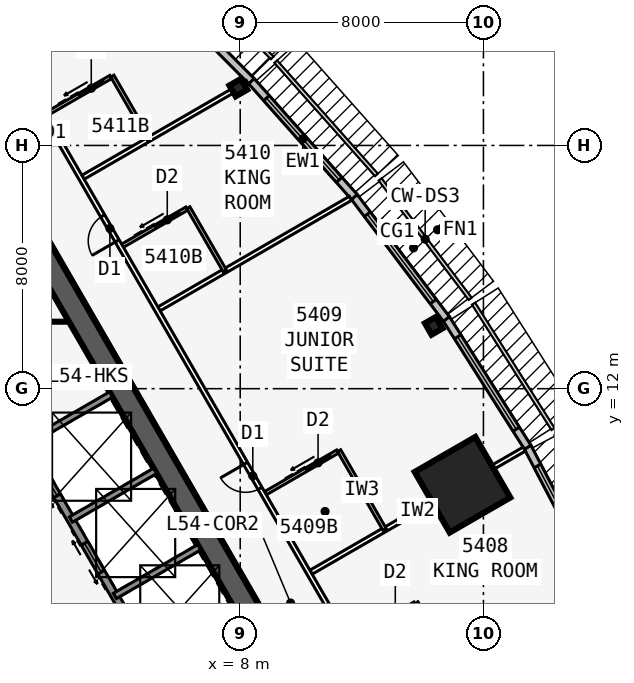
"""IFC4 building model, lengths in metres.
Left out: names, types, materials, properties, quantities, classifications, styles, units other than length and angle.
Written with IfcOpenShell. Run it as: python <this file> out.ifc"""

import sys

from ifc_helpers import new_model, si_unit, direction, frame, frame_2d, origin, origin_2d, place, context, subcontext, project, spatial, rectangle, i_section, extrude, element, fill, save


model = new_model("IFC4")
c1 = context("Model", 3, precision=1e-05, world=origin(), true_north=direction((0.0, 1.0)))
c2 = subcontext(c1, "Body", "Model", "MODEL_VIEW")
j1 = project(units=[si_unit("LENGTHUNIT", "METRE"), si_unit("PLANEANGLEUNIT", "RADIAN")], contexts=[c1])
p1 = place(None, origin())
s1 = spatial("IfcSite", under=j1, at=p1, CompositionType="ELEMENT")
p2 = place(p1, origin())
s2 = spatial("IfcBuilding", under=s1, at=p2, CompositionType="ELEMENT")
p3 = place(p2, frame((0.0, 0.0, 204.5)))
s3 = spatial("IfcBuildingStorey", under=s2, at=p3, CompositionType="ELEMENT", Elevation=204.5)
p4 = place(p3, frame((16.5, -9.526, 0.0), z_axis=(0.0, 0.0, 1.0), x_axis=(-0.499999749417, 0.866025548458, 0.0)))
e1 = element("IfcWall", 1, at=p4, inside=s3, PredefinedType="SHEAR", context=c2, shape_type="SweptSolid", body=[
    extrude(rectangle(XDim=33.0, YDim=0.75, at=frame_2d((16.5, 0.0))), origin(), (0.0, 0.0, 1.0), 3.6),
])
p5 = place(p4, frame((14.15, 0.0, 0.0)))
e2 = element("IfcOpeningElement", 2, at=p5, cuts=e1, PredefinedType="OPENING", context=c2, shape_type="SweptSolid", body=[
    extrude(rectangle(XDim=1.8, YDim=2.13, at=frame_2d((0.9, 1.065))), frame((0.0, 0.385, 0.0), z_axis=(0.0, -1.0, 0.0), x_axis=(1.0, 0.0, 0.0)), (0.0, 0.0, 1.0), 0.77),
])
p6 = place(p4, frame((12.6, 0.0, 0.0)))
e3 = element("IfcOpeningElement", 3, at=p6, cuts=e1, PredefinedType="OPENING", context=c2, shape_type="SweptSolid", body=[
    extrude(rectangle(XDim=1.0, YDim=2.13, at=frame_2d((0.5, 1.065))), frame((0.0, 0.385, 0.0), z_axis=(0.0, -1.0, 0.0), x_axis=(1.0, 0.0, 0.0)), (0.0, 0.0, 1.0), 0.77),
])
p7 = place(p3, frame((5.379, 2.586, 0.0), z_axis=(0.0, 0.0, 1.0), x_axis=(-0.500001375892, 0.866024609411, 0.0)))
e4 = element("IfcWall", 4, at=p7, inside=s3, PredefinedType="SOLIDWALL", context=c2, shape_type="SweptSolid", body=[
    extrude(rectangle(XDim=10.633, YDim=0.25, at=frame_2d((5.316, 0.0))), origin(), (0.0, 0.0, 1.0), 3.435),
])
p8 = place(p7, frame((9.164, 0.0, 0.0)))
e5 = element("IfcOpeningElement", 5, at=p8, cuts=e4, PredefinedType="OPENING", context=c2, shape_type="SweptSolid", body=[
    extrude(rectangle(XDim=0.9, YDim=2.13, at=frame_2d((0.45, 1.065))), frame((0.0, 0.135, 0.0), z_axis=(0.0, -1.0, 0.0), x_axis=(1.0, 0.0, 0.0)), (0.0, 0.0, 1.0), 0.27),
])
p9 = place(p7, frame((1.0, 0.0, 0.0)))
e6 = element("IfcOpeningElement", 6, at=p9, cuts=e4, PredefinedType="OPENING", context=c2, shape_type="SweptSolid", body=[
    extrude(rectangle(XDim=1.1, YDim=2.13, at=frame_2d((0.55, 1.065))), frame((0.0, 0.135, 0.0), z_axis=(0.0, -1.0, 0.0), x_axis=(1.0, 0.0, 0.0)), (0.0, 0.0, 1.0), 0.27),
])
p10 = place(p7, frame((3.9, 0.0, 0.0)))
e7 = element("IfcOpeningElement", 7, at=p10, cuts=e4, PredefinedType="OPENING", context=c2, shape_type="SweptSolid", body=[
    extrude(rectangle(XDim=1.1, YDim=2.13, at=frame_2d((0.55, 1.065))), frame((0.0, 0.135, 0.0), z_axis=(0.0, -1.0, 0.0), x_axis=(1.0, 0.0, 0.0)), (0.0, 0.0, 1.0), 0.27),
])
p11 = place(p7, frame((6.8, 0.0, 0.0)))
e8 = element("IfcOpeningElement", 8, at=p11, cuts=e4, PredefinedType="OPENING", context=c2, shape_type="SweptSolid", body=[
    extrude(rectangle(XDim=1.1, YDim=2.13, at=frame_2d((0.55, 1.065))), frame((0.0, 0.135, 0.0), z_axis=(0.0, -1.0, 0.0), x_axis=(1.0, 0.0, 0.0)), (0.0, 0.0, 1.0), 0.27),
])
for number, where, z_axis, x_axis in (
    (9, (3.879, 5.184, 0.0), (0.0, 0.0, 1.0), (0.866, 0.5, 0.0)),
    (10, (2.429, 7.696, 0.0), (0.0, 0.0, 1.0), (0.866, 0.5, 0.0)),
    (11, (0.979, 10.207, 0.0), (0.0, 0.0, 1.0), (0.866, 0.5, 0.0)),
):
    element("IfcWall", number, at=place(p3, frame(where, z_axis=z_axis, x_axis=x_axis)), inside=s3, PredefinedType="SOLIDWALL", context=c2, shape_type="SweptSolid", body=[
        extrude(rectangle(XDim=3.2, YDim=0.2, at=frame_2d((1.6, 0.0))), origin(), (0.0, 0.0, 1.0), 3.435),
    ])
for number, where, z_axis, x_axis in (
    (12, (14.363, 14.066, 0.0), (0.0, 0.0, 1.0), (0.866, 0.5, 0.0)),
    (13, (7.937, 21.903, 0.0), (0.0, 0.0, 1.0), (-0.5, 0.866, 0.0)),
):
    element("IfcColumn", number, at=place(p3, frame(where, z_axis=z_axis, x_axis=x_axis)), inside=s3, PredefinedType="COLUMN", context=c2, shape_type="SweptSolid", body=[
        extrude(i_section(OverallWidth=0.411, OverallDepth=0.434, WebThickness=0.036, FlangeThickness=0.057, at=origin_2d()), origin(), (0.0, 0.0, 1.0), 3.6),
    ])
p12 = place(p3, frame((15.312, 8.84, 0.0), z_axis=(0.0, 0.0, 1.0), x_axis=(0.866025403784, 0.5, 0.0)))
e14 = element("IfcColumn", 14, at=p12, inside=s3, PredefinedType="COLUMN", context=c2, shape_type="SweptSolid", body=[
    extrude(rectangle(XDim=2.3, YDim=2.3, at=origin_2d()), origin(), (0.0, 0.0, 1.0), 3.6),
])
p13 = place(p3, frame((19.772, 5.648, 0.0), z_axis=(0.0, 0.0, 1.0), x_axis=(-0.463976002579, 0.885847768542, 0.0)))
e15 = element("IfcWall", 15, at=p13, inside=s3, PredefinedType="STANDARD", context=c2, shape_type="SweptSolid", body=[
    extrude(rectangle(XDim=5.004, YDim=0.25, at=frame_2d((2.502, 0.0))), origin(), (0.0, 0.0, 1.0), 3.435),
])
p14 = place(p13, frame((0.702, 0.0, 0.45)))
e16 = element("IfcOpeningElement", 16, at=p14, cuts=e15, PredefinedType="OPENING", context=c2, shape_type="SweptSolid", body=[
    extrude(rectangle(XDim=3.6, YDim=2.6, at=frame_2d((1.8, 1.3))), frame((0.0, 0.135, 0.0), z_axis=(0.0, -1.0, 0.0), x_axis=(1.0, 0.0, 0.0)), (0.0, 0.0, 1.0), 0.27),
])
p15 = place(p3, frame((17.456, 10.072, 0.0), z_axis=(0.0, 0.0, 1.0), x_axis=(-0.535220361449, 0.844712474568, 0.0)))
e17 = element("IfcWall", 17, at=p15, inside=s3, PredefinedType="STANDARD", context=c2, shape_type="SweptSolid", body=[
    extrude(rectangle(XDim=5.004, YDim=0.25, at=frame_2d((2.502, 0.0))), origin(), (0.0, 0.0, 1.0), 3.435),
])
p16 = place(p15, frame((0.702, 0.0, 0.45)))
e18 = element("IfcOpeningElement", 18, at=p16, cuts=e17, PredefinedType="OPENING", context=c2, shape_type="SweptSolid", body=[
    extrude(rectangle(XDim=3.6, YDim=2.6, at=frame_2d((1.8, 1.3))), frame((0.0, 0.135, 0.0), z_axis=(0.0, -1.0, 0.0), x_axis=(1.0, 0.0, 0.0)), (0.0, 0.0, 1.0), 0.27),
])
p17 = place(p3, frame((14.783, 14.291, 0.0), z_axis=(0.0, 0.0, 1.0), x_axis=(-0.602408653511, 0.798187831388, 0.0)))
e19 = element("IfcWall", 19, at=p17, inside=s3, PredefinedType="STANDARD", context=c2, shape_type="SweptSolid", body=[
    extrude(rectangle(XDim=5.038, YDim=0.25, at=frame_2d((2.519, 0.0))), origin(), (0.0, 0.0, 1.0), 3.435),
])
p18 = place(p17, frame((0.719, 0.0, 0.45)))
e20 = element("IfcOpeningElement", 20, at=p18, cuts=e19, PredefinedType="OPENING", context=c2, shape_type="SweptSolid", body=[
    extrude(rectangle(XDim=3.6, YDim=2.6, at=frame_2d((1.8, 1.3))), frame((0.0, 0.135, 0.0), z_axis=(0.0, -1.0, 0.0), x_axis=(1.0, 0.0, 0.0)), (0.0, 0.0, 1.0), 0.27),
])
p19 = place(p3, frame((11.754, 18.304, 0.0), z_axis=(0.0, 0.0, 1.0), x_axis=(-0.664348996191, 0.747422511876, 0.0)))
e21 = element("IfcWall", 21, at=p19, inside=s3, PredefinedType="STANDARD", context=c2, shape_type="SweptSolid", body=[
    extrude(rectangle(XDim=5.105, YDim=0.25, at=frame_2d((2.552, 0.0))), origin(), (0.0, 0.0, 1.0), 3.435),
])
p20 = place(p19, frame((0.752, 0.0, 0.45)))
e22 = element("IfcOpeningElement", 22, at=p20, cuts=e21, PredefinedType="OPENING", context=c2, shape_type="SweptSolid", body=[
    extrude(rectangle(XDim=3.6, YDim=2.6, at=frame_2d((1.8, 1.3))), frame((0.0, 0.135, 0.0), z_axis=(0.0, -1.0, 0.0), x_axis=(1.0, 0.0, 0.0)), (0.0, 0.0, 1.0), 0.27),
])
p21 = place(p3, frame((8.368, 22.115, 0.0), z_axis=(0.0, 0.0, 1.0), x_axis=(-0.704149946111, 0.710051303352, 0.0)))
e23 = element("IfcWall", 23, at=p21, inside=s3, PredefinedType="STANDARD", context=c2, shape_type="SweptSolid", body=[
    extrude(rectangle(XDim=2.069, YDim=0.25, at=frame_2d((1.034, 0.0))), origin(), (0.0, 0.0, 1.0), 3.435),
])
p22 = place(p3, frame((20.102, -11.115, 0.0), z_axis=(0.0, 0.0, 1.0), x_axis=(-0.500000265775, 0.866025250339, 0.0)))
e24 = element("IfcWall", 24, at=p22, inside=s3, PredefinedType="PARTITIONING", context=c2, shape_type="SweptSolid", body=[
    extrude(rectangle(XDim=39.354, YDim=0.15, at=frame_2d((19.677, 0.0))), origin(), (0.0, 0.0, 1.0), 3.435),
])
p23 = place(p22, frame((1.665, 0.0, 0.0)))
e25 = element("IfcOpeningElement", 25, at=p23, cuts=e24, PredefinedType="OPENING", context=c2, shape_type="SweptSolid", body=[
    extrude(rectangle(XDim=0.95, YDim=2.13, at=frame_2d((0.475, 1.065))), frame((0.0, 0.085, 0.0), z_axis=(0.0, -1.0, 0.0), x_axis=(1.0, 0.0, 0.0)), (0.0, 0.0, 1.0), 0.17),
])
p24 = place(p22, frame((12.902, 0.0, 0.0)))
e26 = element("IfcOpeningElement", 26, at=p24, cuts=e24, PredefinedType="OPENING", context=c2, shape_type="SweptSolid", body=[
    extrude(rectangle(XDim=0.95, YDim=2.13, at=frame_2d((0.475, 1.065))), frame((0.0, 0.085, 0.0), z_axis=(0.0, -1.0, 0.0), x_axis=(1.0, 0.0, 0.0)), (0.0, 0.0, 1.0), 0.17),
])
p25 = place(p22, frame((17.302, 0.0, 0.0)))
e27 = element("IfcOpeningElement", 27, at=p25, cuts=e24, PredefinedType="OPENING", context=c2, shape_type="SweptSolid", body=[
    extrude(rectangle(XDim=0.95, YDim=2.13, at=frame_2d((0.475, 1.065))), frame((0.0, 0.085, 0.0), z_axis=(0.0, -1.0, 0.0), x_axis=(1.0, 0.0, 0.0)), (0.0, 0.0, 1.0), 0.17),
])
p26 = place(p22, frame((22.902, 0.0, 0.0)))
e28 = element("IfcOpeningElement", 28, at=p26, cuts=e24, PredefinedType="OPENING", context=c2, shape_type="SweptSolid", body=[
    extrude(rectangle(XDim=0.95, YDim=2.13, at=frame_2d((0.475, 1.065))), frame((0.0, 0.085, 0.0), z_axis=(0.0, -1.0, 0.0), x_axis=(1.0, 0.0, 0.0)), (0.0, 0.0, 1.0), 0.17),
])
p27 = place(p22, frame((32.302, 0.0, 0.0)))
e29 = element("IfcOpeningElement", 29, at=p27, cuts=e24, PredefinedType="OPENING", context=c2, shape_type="SweptSolid", body=[
    extrude(rectangle(XDim=0.95, YDim=2.13, at=frame_2d((0.475, 1.065))), frame((0.0, 0.085, 0.0), z_axis=(0.0, -1.0, 0.0), x_axis=(1.0, 0.0, 0.0)), (0.0, 0.0, 1.0), 0.17),
])
p28 = place(p22, frame((37.302, 0.0, 0.0)))
e30 = element("IfcOpeningElement", 30, at=p28, cuts=e24, PredefinedType="OPENING", context=c2, shape_type="SweptSolid", body=[
    extrude(rectangle(XDim=0.95, YDim=2.13, at=frame_2d((0.475, 1.065))), frame((0.0, 0.085, 0.0), z_axis=(0.0, -1.0, 0.0), x_axis=(1.0, 0.0, 0.0)), (0.0, 0.0, 1.0), 0.17),
])
p29 = place(p3, frame((12.829, 1.633, 0.0), z_axis=(0.0, 0.0, 1.0), x_axis=(0.866030558329, 0.49999107196, 0.0)))
e31 = element("IfcWall", 31, at=p29, inside=s3, PredefinedType="PARTITIONING", context=c2, shape_type="SweptSolid", body=[
    extrude(rectangle(XDim=7.894, YDim=0.15, at=frame_2d((3.947, 0.0))), origin(), (0.0, 0.0, 1.0), 2.589),
])
p30 = place(p3, frame((10.329, 5.963, 0.0), z_axis=(0.0, 0.0, 1.0), x_axis=(0.866016460812, 0.500015489362, 0.0)))
e32 = element("IfcWall", 32, at=p30, inside=s3, PredefinedType="PARTITIONING", context=c2, shape_type="SweptSolid", body=[
    extrude(rectangle(XDim=8.101, YDim=0.15, at=frame_2d((4.051, 0.0))), origin(), (0.0, 0.0, 1.0), 2.589),
])
p31 = place(p3, frame((5.329, 14.623, 0.0), z_axis=(0.0, 0.0, 1.0), x_axis=(0.866017877653, 0.500013035415, 0.0)))
e33 = element("IfcWall", 33, at=p31, inside=s3, PredefinedType="PARTITIONING", context=c2, shape_type="SweptSolid", body=[
    extrude(rectangle(XDim=7.273, YDim=0.15, at=frame_2d((3.636, 0.0))), origin(), (0.0, 0.0, 1.0), 2.589),
])
p32 = place(p3, frame((2.829, 18.954, 0.0), z_axis=(0.0, 0.0, 1.0), x_axis=(0.866026604282, 0.499997920671, 0.0)))
e34 = element("IfcWall", 34, at=p32, inside=s3, PredefinedType="PARTITIONING", context=c2, shape_type="SweptSolid", body=[
    extrude(rectangle(XDim=6.24, YDim=0.15, at=frame_2d((3.12, 0.0))), origin(), (0.0, 0.0, 1.0), 2.589),
])
p33 = place(p3, frame((14.993, 2.883, 0.0), z_axis=(0.0, 0.0, 1.0), x_axis=(-0.500001309137, 0.866024647952, 0.0)))
e35 = element("IfcWall", 35, at=p33, inside=s3, PredefinedType="PLUMBINGWALL", context=c2, shape_type="SweptSolid", body=[
    extrude(rectangle(XDim=2.4, YDim=0.12, at=frame_2d((1.2, 0.0))), origin(), (0.0, 0.0, 1.0), 3.435),
])
p34 = place(p3, frame((11.628, 3.711, 0.0), z_axis=(0.0, 0.0, 1.0), x_axis=(0.866048967903, 0.499959183527, 0.0)))
e36 = element("IfcWall", 36, at=p34, inside=s3, PredefinedType="PLUMBINGWALL", context=c2, shape_type="SweptSolid", body=[
    extrude(rectangle(XDim=2.44, YDim=0.12, at=frame_2d((1.22, 0.0))), origin(), (0.0, 0.0, 1.0), 3.435),
])
p35 = place(p34, frame((1.25, 0.0, 0.0)))
e37 = element("IfcOpeningElement", 37, at=p35, cuts=e36, PredefinedType="OPENING", context=c2, shape_type="SweptSolid", body=[
    extrude(rectangle(XDim=0.9, YDim=2.13, at=frame_2d((0.45, 1.065))), frame((0.0, 0.07, 0.0), z_axis=(0.0, -1.0, 0.0), x_axis=(1.0, 0.0, 0.0)), (0.0, 0.0, 1.0), 0.14),
])
p36 = place(p3, frame((12.753, 7.363, 0.0), z_axis=(0.0, 0.0, 1.0), x_axis=(-0.499990139034, 0.866031096941, 0.0)))
e38 = element("IfcWall", 38, at=p36, inside=s3, PredefinedType="PLUMBINGWALL", context=c2, shape_type="SweptSolid", body=[
    extrude(rectangle(XDim=3.0, YDim=0.12, at=frame_2d((1.5, 0.0))), origin(), (0.0, 0.0, 1.0), 3.435),
])
p37 = place(p3, frame((8.829, 8.561, 0.0), z_axis=(0.0, 0.0, 1.0), x_axis=(0.866035715982, 0.499982138324, 0.0)))
e39 = element("IfcWall", 39, at=p37, inside=s3, PredefinedType="PLUMBINGWALL", context=c2, shape_type="SweptSolid", body=[
    extrude(rectangle(XDim=2.74, YDim=0.12, at=frame_2d((1.37, 0.0))), origin(), (0.0, 0.0, 1.0), 3.435),
])
p38 = place(p37, frame((1.55, 0.0, 0.0)))
e40 = element("IfcOpeningElement", 40, at=p38, cuts=e39, PredefinedType="OPENING", context=c2, shape_type="SweptSolid", body=[
    extrude(rectangle(XDim=0.9, YDim=2.13, at=frame_2d((0.45, 1.065))), frame((0.0, 0.07, 0.0), z_axis=(0.0, -1.0, 0.0), x_axis=(1.0, 0.0, 0.0)), (0.0, 0.0, 1.0), 0.14),
])
p39 = place(p3, frame((7.493, 15.873, 0.0), z_axis=(0.0, 0.0, 1.0), x_axis=(-0.499957262057, 0.866050077142, 0.0)))
e41 = element("IfcWall", 41, at=p39, inside=s3, PredefinedType="PLUMBINGWALL", context=c2, shape_type="SweptSolid", body=[
    extrude(rectangle(XDim=2.4, YDim=0.12, at=frame_2d((1.2, 0.0))), origin(), (0.0, 0.0, 1.0), 3.435),
])
p40 = place(p3, frame((4.128, 16.702, 0.0), z_axis=(0.0, 0.0, 1.0), x_axis=(0.866048967903, 0.499959183527, 0.0)))
e42 = element("IfcWall", 42, at=p40, inside=s3, PredefinedType="PLUMBINGWALL", context=c2, shape_type="SweptSolid", body=[
    extrude(rectangle(XDim=2.44, YDim=0.12, at=frame_2d((1.22, 0.0))), origin(), (0.0, 0.0, 1.0), 3.435),
])
p41 = place(p40, frame((1.25, 0.0, 0.0)))
e43 = element("IfcOpeningElement", 43, at=p41, cuts=e42, PredefinedType="OPENING", context=c2, shape_type="SweptSolid", body=[
    extrude(rectangle(XDim=0.9, YDim=2.13, at=frame_2d((0.45, 1.065))), frame((0.0, 0.07, 0.0), z_axis=(0.0, -1.0, 0.0), x_axis=(1.0, 0.0, 0.0)), (0.0, 0.0, 1.0), 0.14),
])
p42 = place(p3, frame((4.993, 20.204, 0.0), z_axis=(0.0, 0.0, 1.0), x_axis=(-0.500001309137, 0.866024647952, 0.0)))
e44 = element("IfcWall", 44, at=p42, inside=s3, PredefinedType="PLUMBINGWALL", context=c2, shape_type="SweptSolid", body=[
    extrude(rectangle(XDim=2.4, YDim=0.12, at=frame_2d((1.2, 0.0))), origin(), (0.0, 0.0, 1.0), 3.435),
])
p43 = place(p3, frame((1.628, 21.032, 0.0), z_axis=(0.0, 0.0, 1.0), x_axis=(0.866048967903, 0.499959183527, 0.0)))
e45 = element("IfcWall", 45, at=p43, inside=s3, PredefinedType="PLUMBINGWALL", context=c2, shape_type="SweptSolid", body=[
    extrude(rectangle(XDim=2.44, YDim=0.12, at=frame_2d((1.22, 0.0))), origin(), (0.0, 0.0, 1.0), 3.435),
])
p44 = place(p43, frame((1.25, 0.0, 0.0)))
e46 = element("IfcOpeningElement", 46, at=p44, cuts=e45, PredefinedType="OPENING", context=c2, shape_type="SweptSolid", body=[
    extrude(rectangle(XDim=0.9, YDim=2.13, at=frame_2d((0.45, 1.065))), frame((0.0, 0.07, 0.0), z_axis=(0.0, -1.0, 0.0), x_axis=(1.0, 0.0, 0.0)), (0.0, 0.0, 1.0), 0.14),
])
p45 = place(p3, frame((-2.367, 14.203, 0.0), z_axis=(0.0, 0.0, 1.0), x_axis=(1.0, 0.0, 0.0)))
e47 = element("IfcWall", 47, at=p45, inside=s3, PredefinedType="PARTITIONING", context=c2, shape_type="SweptSolid", body=[
    extrude(rectangle(XDim=4.734, YDim=0.1, at=frame_2d((2.367, 0.0))), origin(), (0.0, 0.0, 1.0), 3.435),
])
p46 = place(p45, frame((0.734, 0.0, 0.0)))
e48 = element("IfcOpeningElement", 48, at=p46, cuts=e47, PredefinedType="OPENING", context=c2, shape_type="SweptSolid", body=[
    extrude(rectangle(XDim=0.9, YDim=2.13, at=frame_2d((0.45, 1.065))), frame((0.0, 0.06, 0.0), z_axis=(0.0, -1.0, 0.0), x_axis=(1.0, 0.0, 0.0)), (0.0, 0.0, 1.0), 0.12),
])
p47 = place(p14, origin())
e49 = element("IfcWindow", 49, at=p47, inside=s3, PartitioningType="SINGLE_PANEL", PredefinedType="WINDOW", context=c2, shape_type="SweptSolid", body=[
    extrude(rectangle(XDim=3.6, YDim=2.6, at=frame_2d((1.8, 1.3))), frame((0.0, 0.03, 0.0), z_axis=(0.0, -1.0, 0.0), x_axis=(1.0, 0.0, 0.0)), (0.0, 0.0, 1.0), 0.06),
])
fill(e16, e49)
p48 = place(p16, origin())
e50 = element("IfcWindow", 50, at=p48, inside=s3, PartitioningType="SINGLE_PANEL", PredefinedType="WINDOW", context=c2, shape_type="SweptSolid", body=[
    extrude(rectangle(XDim=3.6, YDim=2.6, at=frame_2d((1.8, 1.3))), frame((0.0, 0.03, 0.0), z_axis=(0.0, -1.0, 0.0), x_axis=(1.0, 0.0, 0.0)), (0.0, 0.0, 1.0), 0.06),
])
fill(e18, e50)
p49 = place(p18, origin())
e51 = element("IfcWindow", 51, at=p49, inside=s3, PartitioningType="SINGLE_PANEL", PredefinedType="WINDOW", context=c2, shape_type="SweptSolid", body=[
    extrude(rectangle(XDim=3.6, YDim=2.6, at=frame_2d((1.8, 1.3))), frame((0.0, 0.03, 0.0), z_axis=(0.0, -1.0, 0.0), x_axis=(1.0, 0.0, 0.0)), (0.0, 0.0, 1.0), 0.06),
])
fill(e20, e51)
p50 = place(p20, origin())
e52 = element("IfcWindow", 52, at=p50, inside=s3, PartitioningType="SINGLE_PANEL", PredefinedType="WINDOW", context=c2, shape_type="SweptSolid", body=[
    extrude(rectangle(XDim=3.6, YDim=2.6, at=frame_2d((1.8, 1.3))), frame((0.0, 0.03, 0.0), z_axis=(0.0, -1.0, 0.0), x_axis=(1.0, 0.0, 0.0)), (0.0, 0.0, 1.0), 0.06),
])
fill(e22, e52)
p51 = place(p38, origin())
e53 = element("IfcDoor", 53, at=p51, inside=s3, OperationType="SLIDING_TO_LEFT", PredefinedType="DOOR", context=c2, shape_type="SweptSolid", body=[
    extrude(rectangle(XDim=0.9, YDim=2.13, at=frame_2d((0.45, 1.065))), frame((0.0, 0.025, 0.0), z_axis=(0.0, -1.0, 0.0), x_axis=(1.0, 0.0, 0.0)), (0.0, 0.0, 1.0), 0.05),
])
fill(e40, e53)
p52 = place(p26, origin())
e54 = element("IfcDoor", 54, at=p52, inside=s3, OperationType="SINGLE_SWING_RIGHT", PredefinedType="DOOR", context=c2, shape_type="SweptSolid", body=[
    extrude(rectangle(XDim=0.95, YDim=2.13, at=frame_2d((0.475, 1.065))), frame((0.0, 0.025, 0.0), z_axis=(0.0, -1.0, 0.0), x_axis=(1.0, 0.0, 0.0)), (0.0, 0.0, 1.0), 0.05),
])
fill(e28, e54)
p53 = place(p41, origin())
e55 = element("IfcDoor", 55, at=p53, inside=s3, OperationType="SLIDING_TO_LEFT", PredefinedType="DOOR", context=c2, shape_type="SweptSolid", body=[
    extrude(rectangle(XDim=0.9, YDim=2.13, at=frame_2d((0.45, 1.065))), frame((0.0, 0.025, 0.0), z_axis=(0.0, -1.0, 0.0), x_axis=(1.0, 0.0, 0.0)), (0.0, 0.0, 1.0), 0.05),
])
fill(e43, e55)
p54 = place(p27, origin())
e56 = element("IfcDoor", 56, at=p54, inside=s3, OperationType="SINGLE_SWING_LEFT", PredefinedType="DOOR", context=c2, shape_type="SweptSolid", body=[
    extrude(rectangle(XDim=0.95, YDim=2.13, at=frame_2d((0.475, 1.065))), frame((0.0, 0.025, 0.0), z_axis=(0.0, -1.0, 0.0), x_axis=(1.0, 0.0, 0.0)), (0.0, 0.0, 1.0), 0.05),
])
fill(e29, e56)
p55 = place(p44, origin())
e57 = element("IfcDoor", 57, at=p55, inside=s3, OperationType="SLIDING_TO_LEFT", PredefinedType="DOOR", context=c2, shape_type="SweptSolid", body=[
    extrude(rectangle(XDim=0.9, YDim=2.13, at=frame_2d((0.45, 1.065))), frame((0.0, 0.025, 0.0), z_axis=(0.0, -1.0, 0.0), x_axis=(1.0, 0.0, 0.0)), (0.0, 0.0, 1.0), 0.05),
])
fill(e46, e57)
p56 = place(p10, origin())
e58 = element("IfcDoor", 58, at=p56, inside=s3, OperationType="DOUBLE_DOOR_SLIDING", PredefinedType="USERDEFINED", context=c2, shape_type="SweptSolid", body=[
    extrude(rectangle(XDim=1.1, YDim=2.13, at=frame_2d((0.55, 1.065))), frame((0.0, 0.025, 0.0), z_axis=(0.0, -1.0, 0.0), x_axis=(1.0, 0.0, 0.0)), (0.0, 0.0, 1.0), 0.05),
])
fill(e7, e58)
p57 = place(p11, origin())
e59 = element("IfcDoor", 59, at=p57, inside=s3, OperationType="DOUBLE_DOOR_SLIDING", PredefinedType="USERDEFINED", context=c2, shape_type="SweptSolid", body=[
    extrude(rectangle(XDim=1.1, YDim=2.13, at=frame_2d((0.55, 1.065))), frame((0.0, 0.025, 0.0), z_axis=(0.0, -1.0, 0.0), x_axis=(1.0, 0.0, 0.0)), (0.0, 0.0, 1.0), 0.05),
])
fill(e8, e59)
save(model, sys.argv[1])
